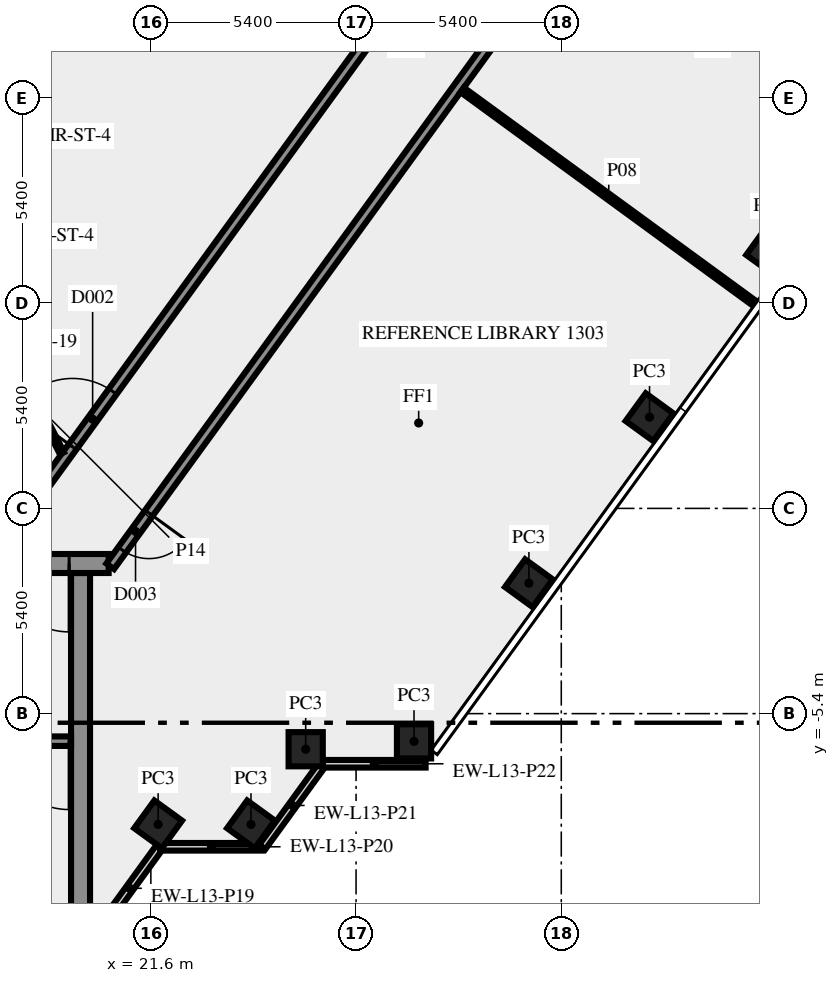
"""IFC4 building model, lengths in metres.
Left out: names, types, materials, properties, quantities, classifications, styles, units other than length and angle.
Written with IfcOpenShell. Run it as: python <this file> out.ifc"""

import sys

from ifc_helpers import new_model, si_unit, direction, frame, frame_2d, origin, origin_2d, place, context, subcontext, project, spatial, rectangle, extrude, element, fill, save


model = new_model("IFC4")
c1 = context("Model", 3, precision=1e-05, world=origin(), true_north=direction((0.0, 1.0)))
c2 = subcontext(c1, "Body", "Model", "MODEL_VIEW")
j1 = project(units=[si_unit("LENGTHUNIT", "METRE"), si_unit("PLANEANGLEUNIT", "RADIAN")], contexts=[c1])
p1 = place(None, origin())
s1 = spatial("IfcSite", under=j1, at=p1, CompositionType="ELEMENT")
p2 = place(p1, origin())
s2 = spatial("IfcBuilding", under=s1, at=p2, CompositionType="ELEMENT")
p3 = place(p2, frame((0.0, 0.0, 59.0)))
s3 = spatial("IfcBuildingStorey", under=s2, at=p3, CompositionType="ELEMENT", Elevation=59.0)
for number, where, z_axis, x_axis in (
    (1, (21.792, -8.315, 0.0), (0.0, 0.0, 1.0), (0.588, 0.809, 0.0)),
    (2, (24.235, -8.315, 0.0), (0.0, 0.0, 1.0), (0.588, 0.809, 0.0)),
    (3, (25.674, -6.337, 0.0), (0.0, 0.0, 1.0), (1.0, 0.0, 0.0)),
    (4, (28.525, -6.13, 0.0), (0.0, 0.0, 1.0), (1.0, 0.0, 0.0)),
    (5, (31.548, -1.969, 0.0), (0.0, 0.0, 1.0), (0.588, 0.809, 0.0)),
    (6, (34.722, 2.4, 0.0), (0.0, 0.0, 1.0), (0.588, 0.809, 0.0)),
    (7, (37.896, 6.769, 0.0), (0.0, 0.0, 1.0), (0.588, 0.809, 0.0)),
):
    element("IfcColumn", number, at=place(p3, frame(where, z_axis=z_axis, x_axis=x_axis)), inside=s3, PredefinedType="COLUMN", context=c2, shape_type="SweptSolid", body=[
        extrude(rectangle(XDim=0.9, YDim=0.9, at=origin_2d()), origin(), (0.0, 0.0, 1.0), 3.65),
    ])
p4 = place(p3, frame((20.253, -11.083, 0.0), z_axis=(0.0, 0.0, 1.0), x_axis=(0.587766567315, 0.809030569476, 0.0)))
e8 = element("IfcWall", 8, at=p4, inside=s3, PredefinedType="SOLIDWALL", context=c2, shape_type="SweptSolid", body=[
    extrude(rectangle(XDim=2.688, YDim=0.2, at=frame_2d((1.344, 0.0))), origin(), (0.0, 0.0, 1.0), 3.65),
])
p5 = place(p3, frame((21.843, -8.904, 0.0), z_axis=(0.0, 0.0, 1.0), x_axis=(1.0, 0.0, 0.0)))
e9 = element("IfcWall", 9, at=p5, inside=s3, PredefinedType="SOLIDWALL", context=c2, shape_type="SweptSolid", body=[
    extrude(rectangle(XDim=2.7, YDim=0.2, at=frame_2d((1.35, 0.0))), origin(), (0.0, 0.0, 1.0), 3.65),
])
p6 = place(p3, frame((24.533, -8.909, 0.0), z_axis=(0.0, 0.0, 1.0), x_axis=(0.587720002413, 0.809064397168, 0.0)))
e10 = element("IfcWall", 10, at=p6, inside=s3, PredefinedType="SOLIDWALL", context=c2, shape_type="SweptSolid", body=[
    extrude(rectangle(XDim=2.7, YDim=0.2, at=frame_2d((1.35, 0.0))), origin(), (0.0, 0.0, 1.0), 3.65),
])
p7 = place(p3, frame((26.13, -6.719, 0.0), z_axis=(0.0, 0.0, 1.0), x_axis=(1.0, 0.0, 0.0)))
e11 = element("IfcWall", 11, at=p7, inside=s3, PredefinedType="SOLIDWALL", context=c2, shape_type="SweptSolid", body=[
    extrude(rectangle(XDim=2.7, YDim=0.2, at=frame_2d((1.35, 0.0))), origin(), (0.0, 0.0, 1.0), 3.65),
])
p8 = place(p3, frame((19.75, -10.5, 0.0), z_axis=(0.0, 0.0, 1.0), x_axis=(0.0, 1.0, 0.0)))
e12 = element("IfcWall", 12, at=p8, inside=s3, PredefinedType="SHEAR", context=c2, shape_type="SweptSolid", body=[
    extrude(rectangle(XDim=8.8, YDim=0.5, at=frame_2d((4.4, 0.0))), origin(), (0.0, 0.0, 1.0), 3.65),
])
p9 = place(p3, frame((19.5, -6.125, 0.0), z_axis=(0.0, 0.0, 1.0), x_axis=(-1.0, 0.0, 0.0)))
e13 = element("IfcWall", 13, at=p9, inside=s3, PredefinedType="SHEAR", context=c2, shape_type="SweptSolid", body=[
    extrude(rectangle(XDim=8.05, YDim=0.25, at=frame_2d((4.025, 0.0))), origin(), (0.0, 0.0, 1.0), 3.65),
])
p10 = place(p9, frame((0.05, 0.0, 0.0)))
e14 = element("IfcOpeningElement", 14, at=p10, cuts=e13, PredefinedType="OPENING", context=c2, shape_type="SweptSolid", body=[
    extrude(rectangle(XDim=1.8, YDim=2.1, at=frame_2d((0.9, 1.05))), frame((0.0, 0.135, 0.0), z_axis=(0.0, -1.0, 0.0), x_axis=(1.0, 0.0, 0.0)), (0.0, 0.0, 1.0), 0.27),
])
p11 = place(p3, frame((20.49, -1.45, 0.0), z_axis=(0.0, 0.0, 1.0), x_axis=(-1.0, 0.0, 0.0)))
e15 = element("IfcWall", 15, at=p11, inside=s3, PredefinedType="SHEAR", context=c2, shape_type="SweptSolid", body=[
    extrude(rectangle(XDim=40.98, YDim=0.5, at=frame_2d((20.49, 0.0))), origin(), (0.0, 0.0, 1.0), 3.65),
])
p12 = place(p11, frame((38.14, 0.0, 0.0)))
e16 = element("IfcOpeningElement", 16, at=p12, cuts=e15, PredefinedType="OPENING", context=c2, shape_type="SweptSolid", body=[
    extrude(rectangle(XDim=1.8, YDim=2.1, at=frame_2d((0.9, 1.05))), frame((0.0, 0.26, 0.0), z_axis=(0.0, -1.0, 0.0), x_axis=(1.0, 0.0, 0.0)), (0.0, 0.0, 1.0), 0.52),
])
p13 = place(p11, frame((35.89, 0.0, 0.0)))
e17 = element("IfcOpeningElement", 17, at=p13, cuts=e15, PredefinedType="OPENING", context=c2, shape_type="SweptSolid", body=[
    extrude(rectangle(XDim=0.9, YDim=2.1, at=frame_2d((0.45, 1.05))), frame((0.0, 0.26, 0.0), z_axis=(0.0, -1.0, 0.0), x_axis=(1.0, 0.0, 0.0)), (0.0, 0.0, 1.0), 0.52),
])
p14 = place(p11, frame((32.94, 0.0, 0.0)))
e18 = element("IfcOpeningElement", 18, at=p14, cuts=e15, PredefinedType="OPENING", context=c2, shape_type="SweptSolid", body=[
    extrude(rectangle(XDim=0.9, YDim=2.1, at=frame_2d((0.45, 1.05))), frame((0.0, 0.26, 0.0), z_axis=(0.0, -1.0, 0.0), x_axis=(1.0, 0.0, 0.0)), (0.0, 0.0, 1.0), 0.52),
])
p15 = place(p11, frame((19.59, 0.0, 0.0)))
e19 = element("IfcOpeningElement", 19, at=p15, cuts=e15, PredefinedType="OPENING", context=c2, shape_type="SweptSolid", body=[
    extrude(rectangle(XDim=2.0, YDim=2.1, at=frame_2d((1.0, 1.05))), frame((0.0, 0.26, 0.0), z_axis=(0.0, -1.0, 0.0), x_axis=(1.0, 0.0, 0.0)), (0.0, 0.0, 1.0), 0.52),
])
p16 = place(p11, frame((7.14, 0.0, 0.0)))
e20 = element("IfcOpeningElement", 20, at=p16, cuts=e15, PredefinedType="OPENING", context=c2, shape_type="SweptSolid", body=[
    extrude(rectangle(XDim=0.9, YDim=2.1, at=frame_2d((0.45, 1.05))), frame((0.0, 0.26, 0.0), z_axis=(0.0, -1.0, 0.0), x_axis=(1.0, 0.0, 0.0)), (0.0, 0.0, 1.0), 0.52),
])
p17 = place(p11, frame((5.028, 0.0, 0.0)))
e21 = element("IfcOpeningElement", 21, at=p17, cuts=e15, PredefinedType="OPENING", context=c2, shape_type="SweptSolid", body=[
    extrude(rectangle(XDim=0.8, YDim=2.1, at=frame_2d((0.4, 1.05))), frame((0.0, 0.26, 0.0), z_axis=(0.0, -1.0, 0.0), x_axis=(1.0, 0.0, 0.0)), (0.0, 0.0, 1.0), 0.52),
])
p18 = place(p11, frame((3.452, 0.0, 0.0)))
e22 = element("IfcOpeningElement", 22, at=p18, cuts=e15, PredefinedType="OPENING", context=c2, shape_type="SweptSolid", body=[
    extrude(rectangle(XDim=0.8, YDim=2.1, at=frame_2d((0.4, 1.05))), frame((0.0, 0.26, 0.0), z_axis=(0.0, -1.0, 0.0), x_axis=(1.0, 0.0, 0.0)), (0.0, 0.0, 1.0), 0.52),
])
p19 = place(p11, frame((1.04, 0.0, 0.0)))
e23 = element("IfcOpeningElement", 23, at=p19, cuts=e15, PredefinedType="OPENING", context=c2, shape_type="SweptSolid", body=[
    extrude(rectangle(XDim=1.8, YDim=2.1, at=frame_2d((0.9, 1.05))), frame((0.0, 0.26, 0.0), z_axis=(0.0, -1.0, 0.0), x_axis=(1.0, 0.0, 0.0)), (0.0, 0.0, 1.0), 0.52),
])
p20 = place(p3, frame((17.545, -1.125, 0.0), z_axis=(0.0, 0.0, 1.0), x_axis=(0.587786323093, 0.809016216391, 0.0)))
e24 = element("IfcWall", 24, at=p20, inside=s3, PredefinedType="SOLIDWALL", context=c2, shape_type="SweptSolid", body=[
    extrude(rectangle(XDim=33.493, YDim=0.25, at=frame_2d((16.747, 0.0))), origin(), (0.0, 0.0, 1.0), 3.65),
])
p21 = place(p20, frame((31.403, 0.0, 0.0)))
e25 = element("IfcOpeningElement", 25, at=p21, cuts=e24, PredefinedType="OPENING", context=c2, shape_type="SweptSolid", body=[
    extrude(rectangle(XDim=1.8, YDim=2.1, at=frame_2d((0.9, 1.05))), frame((0.0, 0.135, 0.0), z_axis=(0.0, -1.0, 0.0), x_axis=(1.0, 0.0, 0.0)), (0.0, 0.0, 1.0), 0.27),
])
p22 = place(p20, frame((3.392, 0.0, 0.0)))
e26 = element("IfcOpeningElement", 26, at=p22, cuts=e24, PredefinedType="OPENING", context=c2, shape_type="SweptSolid", body=[
    extrude(rectangle(XDim=1.8, YDim=2.1, at=frame_2d((0.9, 1.05))), frame((0.0, 0.135, 0.0), z_axis=(0.0, -1.0, 0.0), x_axis=(1.0, 0.0, 0.0)), (0.0, 0.0, 1.0), 0.27),
])
p23 = place(p3, frame((43.467, 30.045, 0.0), z_axis=(0.0, 0.0, 1.0), x_axis=(-0.587784726077, -0.809017376692, 0.0)))
e27 = element("IfcWall", 27, at=p23, inside=s3, PredefinedType="SOLIDWALL", context=c2, shape_type="SweptSolid", body=[
    extrude(rectangle(XDim=39.02, YDim=0.25, at=frame_2d((19.51, 0.0))), origin(), (0.0, 0.0, 1.0), 3.65),
])
p24 = place(p23, frame((11.404, 0.0, 0.0)))
e28 = element("IfcOpeningElement", 28, at=p24, cuts=e27, PredefinedType="OPENING", context=c2, shape_type="SweptSolid", body=[
    extrude(rectangle(XDim=0.9, YDim=2.1, at=frame_2d((0.45, 1.05))), frame((0.0, 0.135, 0.0), z_axis=(0.0, -1.0, 0.0), x_axis=(1.0, 0.0, 0.0)), (0.0, 0.0, 1.0), 0.27),
])
p25 = place(p23, frame((13.004, 0.0, 0.0)))
e29 = element("IfcOpeningElement", 29, at=p25, cuts=e27, PredefinedType="OPENING", context=c2, shape_type="SweptSolid", body=[
    extrude(rectangle(XDim=1.0, YDim=2.1, at=frame_2d((0.5, 1.05))), frame((0.0, 0.135, 0.0), z_axis=(0.0, -1.0, 0.0), x_axis=(1.0, 0.0, 0.0)), (0.0, 0.0, 1.0), 0.27),
])
p26 = place(p23, frame((37.287, 0.0, 0.0)))
e30 = element("IfcOpeningElement", 30, at=p26, cuts=e27, PredefinedType="OPENING", context=c2, shape_type="SweptSolid", body=[
    extrude(rectangle(XDim=1.2, YDim=2.1, at=frame_2d((0.6, 1.05))), frame((0.0, 0.135, 0.0), z_axis=(0.0, -1.0, 0.0), x_axis=(1.0, 0.0, 0.0)), (0.0, 0.0, 1.0), 0.27),
])
p27 = place(p23, frame((0.224, 0.0, 0.0)))
e31 = element("IfcOpeningElement", 31, at=p27, cuts=e27, PredefinedType="OPENING", context=c2, shape_type="SweptSolid", body=[
    extrude(rectangle(XDim=0.9, YDim=2.1, at=frame_2d((0.45, 1.05))), frame((0.0, 0.135, 0.0), z_axis=(0.0, -1.0, 0.0), x_axis=(1.0, 0.0, 0.0)), (0.0, 0.0, 1.0), 0.27),
])
p28 = place(p3, frame((29.793, 11.012, 0.0), z_axis=(0.0, 0.0, 1.0), x_axis=(0.807645841498, -0.589667868135, 0.0)))
e32 = element("IfcWall", 32, at=p28, inside=s3, PredefinedType="PARTITIONING", context=c2, shape_type="SweptSolid", body=[
    extrude(rectangle(XDim=9.551, YDim=0.15, at=frame_2d((4.775, 0.0))), origin(), (0.0, 0.0, 1.0), 2.75),
])
p29 = place(p3, frame((18.0, 3.925, 0.0), z_axis=(0.0, 0.0, 1.0), x_axis=(0.453950796792, -0.891026752736, 0.0)))
e33 = element("IfcWall", 33, at=p29, inside=s3, PredefinedType="PARTITIONING", context=c2, shape_type="SweptSolid", body=[
    extrude(rectangle(XDim=2.778, YDim=0.12, at=frame_2d((1.389, 0.0))), origin(), (0.0, 0.0, 1.0), 3.65),
])
p30 = place(p10, origin())
e34 = element("IfcDoor", 34, at=p30, inside=s3, OperationType="DOUBLE_DOOR_SINGLE_SWING", PredefinedType="DOOR", context=c2, shape_type="SweptSolid", body=[
    extrude(rectangle(XDim=1.8, YDim=2.1, at=frame_2d((0.9, 1.05))), frame((0.0, 0.025, 0.0), z_axis=(0.0, -1.0, 0.0), x_axis=(1.0, 0.0, 0.0)), (0.0, 0.0, 1.0), 0.05),
])
fill(e14, e34)
p31 = place(p19, origin())
e35 = element("IfcDoor", 35, at=p31, inside=s3, OperationType="DOUBLE_DOOR_SINGLE_SWING", PredefinedType="DOOR", context=c2, shape_type="SweptSolid", body=[
    extrude(rectangle(XDim=1.8, YDim=2.1, at=frame_2d((0.9, 1.05))), frame((0.0, 0.025, 0.0), z_axis=(0.0, -1.0, 0.0), x_axis=(1.0, 0.0, 0.0)), (0.0, 0.0, 1.0), 0.05),
])
fill(e23, e35)
p32 = place(p22, origin())
e36 = element("IfcDoor", 36, at=p32, inside=s3, OperationType="DOUBLE_DOOR_SINGLE_SWING", PredefinedType="DOOR", context=c2, shape_type="SweptSolid", body=[
    extrude(rectangle(XDim=1.8, YDim=2.1, at=frame_2d((0.9, 1.05))), frame((0.0, 0.025, 0.0), z_axis=(0.0, -1.0, 0.0), x_axis=(1.0, 0.0, 0.0)), (0.0, 0.0, 1.0), 0.05),
])
fill(e26, e36)
p33 = place(p26, origin())
e37 = element("IfcDoor", 37, at=p33, inside=s3, OperationType="SINGLE_SWING_RIGHT", PredefinedType="DOOR", context=c2, shape_type="SweptSolid", body=[
    extrude(rectangle(XDim=1.2, YDim=2.1, at=frame_2d((0.6, 1.05))), frame((0.0, 0.025, 0.0), z_axis=(0.0, -1.0, 0.0), x_axis=(1.0, 0.0, 0.0)), (0.0, 0.0, 1.0), 0.05),
])
fill(e30, e37)
save(model, sys.argv[1])
